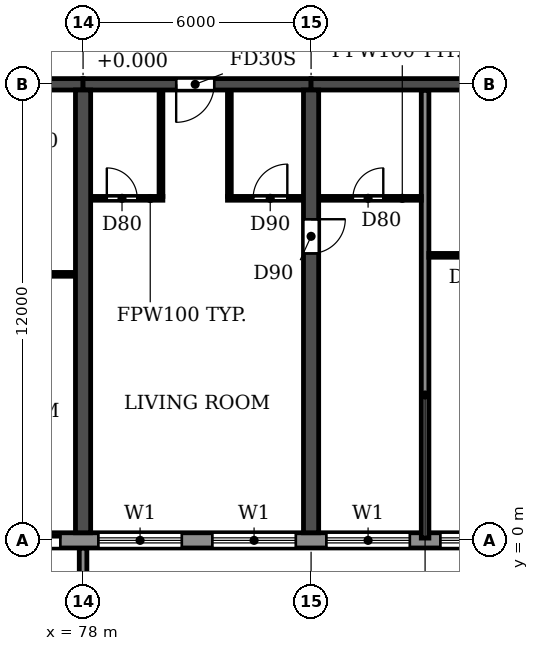
"""IFC4 building model, lengths in metres.
Left out: names, types, materials, properties, quantities, classifications, styles, units other than length and angle.
Written with IfcOpenShell. Run it as: python <this file> out.ifc"""

import sys

from ifc_helpers import new_model, si_unit, direction, frame, frame_2d, origin, place, context, subcontext, project, spatial, polyline, rectangle, outline, extrude, source, transform, mapped, element, fill, save


model = new_model("IFC4")
c1 = context("Model", 3, precision=1e-05, world=origin(), true_north=direction((0.0, 1.0)))
c2 = subcontext(c1, "Body", "Model", "MODEL_VIEW")
j1 = project(units=[si_unit("LENGTHUNIT", "METRE"), si_unit("PLANEANGLEUNIT", "RADIAN")], contexts=[c1])
p1 = place(None, origin())
s1 = spatial("IfcSite", under=j1, at=p1, CompositionType="ELEMENT")
p2 = place(p1, origin())
s2 = spatial("IfcBuilding", under=s1, at=p2, CompositionType="ELEMENT")
p3 = place(p2, frame((0.0, 0.0, 33.3)))
s3 = spatial("IfcBuildingStorey", under=s2, at=p3, CompositionType="ELEMENT", Elevation=33.3)
p4 = place(p3, frame((78.0, 0.2, 0.0), z_axis=(0.0, 0.0, 1.0), x_axis=(0.0, 1.0, 0.0)))
e1 = element("IfcWall", 1, at=p4, inside=s3, PredefinedType="SHEAR", context=c2, shape_type="SweptSolid", body=[
    extrude(rectangle(XDim=11.65, YDim=0.4, at=frame_2d((5.825, 0.0))), origin(), (0.0, 0.0, 1.0), 3.05),
])
p5 = place(p3, frame((84.0, 0.2, 0.0), z_axis=(0.0, 0.0, 1.0), x_axis=(0.0, 1.0, 0.0)))
e2 = element("IfcWall", 2, at=p5, inside=s3, PredefinedType="SHEAR", context=c2, shape_type="SweptSolid", body=[
    extrude(rectangle(XDim=11.65, YDim=0.4, at=frame_2d((5.825, 0.0))), origin(), (0.0, 0.0, 1.0), 3.05),
])
p6 = place(p5, frame((7.35, 0.0, 0.0)))
e3 = element("IfcOpeningElement", 3, at=p6, cuts=e2, PredefinedType="OPENING", context=c2, shape_type="SweptSolid", body=[
    extrude(rectangle(XDim=0.9, YDim=2.1, at=frame_2d((0.45, 1.05))), frame((0.0, 0.21, 0.0), z_axis=(0.0, -1.0, 0.0), x_axis=(1.0, 0.0, 0.0)), (0.0, 0.0, 1.0), 0.42),
])
p7 = place(p3, frame((72.0, 12.0, 0.0), z_axis=(0.0, 0.0, 1.0), x_axis=(1.0, 0.0, 0.0)))
e4 = element("IfcWall", 4, at=p7, inside=s3, PredefinedType="SHEAR", context=c2, shape_type="SweptSolid", body=[
    extrude(rectangle(XDim=6.0, YDim=0.3, at=frame_2d((3.0, 0.0))), origin(), (0.0, 0.0, 1.0), 2.45),
])
p8 = place(p7, frame((2.45, 0.0, 0.0)))
e5 = element("IfcOpeningElement", 5, at=p8, cuts=e4, PredefinedType="OPENING", context=c2, shape_type="SweptSolid", body=[
    extrude(rectangle(XDim=1.0, YDim=2.1, at=frame_2d((0.5, 1.05))), frame((0.0, 0.16, 0.0), z_axis=(0.0, -1.0, 0.0), x_axis=(1.0, 0.0, 0.0)), (0.0, 0.0, 1.0), 0.32),
])
p9 = place(p3, frame((78.0, 12.0, 0.0), z_axis=(0.0, 0.0, 1.0), x_axis=(1.0, 0.0, 0.0)))
e6 = element("IfcWall", 6, at=p9, inside=s3, PredefinedType="SHEAR", context=c2, shape_type="SweptSolid", body=[
    extrude(rectangle(XDim=6.0, YDim=0.3, at=frame_2d((3.0, 0.0))), origin(), (0.0, 0.0, 1.0), 2.45),
])
p10 = place(p9, frame((2.45, 0.0, 0.0)))
e7 = element("IfcOpeningElement", 7, at=p10, cuts=e6, PredefinedType="OPENING", context=c2, shape_type="SweptSolid", body=[
    extrude(rectangle(XDim=1.0, YDim=2.1, at=frame_2d((0.5, 1.05))), frame((0.0, 0.16, 0.0), z_axis=(0.0, -1.0, 0.0), x_axis=(1.0, 0.0, 0.0)), (0.0, 0.0, 1.0), 0.32),
])
p11 = place(p3, frame((84.0, 12.0, 0.0), z_axis=(0.0, 0.0, 1.0), x_axis=(1.0, 0.0, 0.0)))
e8 = element("IfcWall", 8, at=p11, inside=s3, PredefinedType="SHEAR", context=c2, shape_type="SweptSolid", body=[
    extrude(rectangle(XDim=6.0, YDim=0.3, at=frame_2d((3.0, 0.0))), origin(), (0.0, 0.0, 1.0), 2.45),
])
p12 = place(p3, frame((4.683, 0.0, 0.0), z_axis=(0.0, 0.0, 1.0), x_axis=(1.0, 0.0, 0.0)))
e9 = element("IfcWall", 9, at=p12, inside=s3, PredefinedType="STANDARD", context=c2, shape_type="SweptSolid", body=[
    extrude(rectangle(XDim=92.634, YDim=0.4, at=frame_2d((46.317, 0.0))), origin(), (0.0, 0.0, 1.0), 3.05),
])
p13 = place(p12, frame((1.717, 0.0, 0.9)))
e10 = element("IfcOpeningElement", 10, at=p13, cuts=e9, PredefinedType="OPENING", context=c2, shape_type="SweptSolid", body=[
    extrude(rectangle(XDim=2.2, YDim=1.5, at=frame_2d((1.1, 0.75))), frame((0.0, 0.21, 0.0), z_axis=(0.0, -1.0, 0.0), x_axis=(1.0, 0.0, 0.0)), (0.0, 0.0, 1.0), 0.42),
])
p14 = place(p12, frame((4.717, 0.0, 0.9)))
e11 = element("IfcOpeningElement", 11, at=p14, cuts=e9, PredefinedType="OPENING", context=c2, shape_type="SweptSolid", body=[
    extrude(rectangle(XDim=2.2, YDim=1.5, at=frame_2d((1.1, 0.75))), frame((0.0, 0.21, 0.0), z_axis=(0.0, -1.0, 0.0), x_axis=(1.0, 0.0, 0.0)), (0.0, 0.0, 1.0), 0.42),
])
p15 = place(p12, frame((7.917, 0.0, 0.0)))
e12 = element("IfcOpeningElement", 12, at=p15, cuts=e9, PredefinedType="OPENING", context=c2, shape_type="SweptSolid", body=[
    extrude(rectangle(XDim=1.8, YDim=2.4, at=frame_2d((0.9, 1.2))), frame((0.0, 0.21, 0.0), z_axis=(0.0, -1.0, 0.0), x_axis=(1.0, 0.0, 0.0)), (0.0, 0.0, 1.0), 0.42),
])
p16 = place(p12, frame((10.717, 0.0, 0.9)))
e13 = element("IfcOpeningElement", 13, at=p16, cuts=e9, PredefinedType="OPENING", context=c2, shape_type="SweptSolid", body=[
    extrude(rectangle(XDim=2.2, YDim=1.5, at=frame_2d((1.1, 0.75))), frame((0.0, 0.21, 0.0), z_axis=(0.0, -1.0, 0.0), x_axis=(1.0, 0.0, 0.0)), (0.0, 0.0, 1.0), 0.42),
])
p17 = place(p12, frame((13.717, 0.0, 0.9)))
e14 = element("IfcOpeningElement", 14, at=p17, cuts=e9, PredefinedType="OPENING", context=c2, shape_type="SweptSolid", body=[
    extrude(rectangle(XDim=2.2, YDim=1.5, at=frame_2d((1.1, 0.75))), frame((0.0, 0.21, 0.0), z_axis=(0.0, -1.0, 0.0), x_axis=(1.0, 0.0, 0.0)), (0.0, 0.0, 1.0), 0.42),
])
p18 = place(p12, frame((16.717, 0.0, 0.9)))
e15 = element("IfcOpeningElement", 15, at=p18, cuts=e9, PredefinedType="OPENING", context=c2, shape_type="SweptSolid", body=[
    extrude(rectangle(XDim=2.2, YDim=1.5, at=frame_2d((1.1, 0.75))), frame((0.0, 0.21, 0.0), z_axis=(0.0, -1.0, 0.0), x_axis=(1.0, 0.0, 0.0)), (0.0, 0.0, 1.0), 0.42),
])
p19 = place(p12, frame((19.717, 0.0, 0.9)))
e16 = element("IfcOpeningElement", 16, at=p19, cuts=e9, PredefinedType="OPENING", context=c2, shape_type="SweptSolid", body=[
    extrude(rectangle(XDim=2.2, YDim=1.5, at=frame_2d((1.1, 0.75))), frame((0.0, 0.21, 0.0), z_axis=(0.0, -1.0, 0.0), x_axis=(1.0, 0.0, 0.0)), (0.0, 0.0, 1.0), 0.42),
])
p20 = place(p12, frame((22.917, 0.0, 0.0)))
e17 = element("IfcOpeningElement", 17, at=p20, cuts=e9, PredefinedType="OPENING", context=c2, shape_type="SweptSolid", body=[
    extrude(rectangle(XDim=1.8, YDim=2.4, at=frame_2d((0.9, 1.2))), frame((0.0, 0.21, 0.0), z_axis=(0.0, -1.0, 0.0), x_axis=(1.0, 0.0, 0.0)), (0.0, 0.0, 1.0), 0.42),
])
p21 = place(p12, frame((25.717, 0.0, 0.9)))
e18 = element("IfcOpeningElement", 18, at=p21, cuts=e9, PredefinedType="OPENING", context=c2, shape_type="SweptSolid", body=[
    extrude(rectangle(XDim=2.2, YDim=1.5, at=frame_2d((1.1, 0.75))), frame((0.0, 0.21, 0.0), z_axis=(0.0, -1.0, 0.0), x_axis=(1.0, 0.0, 0.0)), (0.0, 0.0, 1.0), 0.42),
])
p22 = place(p12, frame((28.717, 0.0, 0.9)))
e19 = element("IfcOpeningElement", 19, at=p22, cuts=e9, PredefinedType="OPENING", context=c2, shape_type="SweptSolid", body=[
    extrude(rectangle(XDim=2.2, YDim=1.5, at=frame_2d((1.1, 0.75))), frame((0.0, 0.21, 0.0), z_axis=(0.0, -1.0, 0.0), x_axis=(1.0, 0.0, 0.0)), (0.0, 0.0, 1.0), 0.42),
])
p23 = place(p12, frame((31.717, 0.0, 0.9)))
e20 = element("IfcOpeningElement", 20, at=p23, cuts=e9, PredefinedType="OPENING", context=c2, shape_type="SweptSolid", body=[
    extrude(rectangle(XDim=2.2, YDim=1.5, at=frame_2d((1.1, 0.75))), frame((0.0, 0.21, 0.0), z_axis=(0.0, -1.0, 0.0), x_axis=(1.0, 0.0, 0.0)), (0.0, 0.0, 1.0), 0.42),
])
p24 = place(p12, frame((34.717, 0.0, 0.9)))
e21 = element("IfcOpeningElement", 21, at=p24, cuts=e9, PredefinedType="OPENING", context=c2, shape_type="SweptSolid", body=[
    extrude(rectangle(XDim=2.2, YDim=1.5, at=frame_2d((1.1, 0.75))), frame((0.0, 0.21, 0.0), z_axis=(0.0, -1.0, 0.0), x_axis=(1.0, 0.0, 0.0)), (0.0, 0.0, 1.0), 0.42),
])
p25 = place(p12, frame((37.717, 0.0, 0.9)))
e22 = element("IfcOpeningElement", 22, at=p25, cuts=e9, PredefinedType="OPENING", context=c2, shape_type="SweptSolid", body=[
    extrude(rectangle(XDim=2.2, YDim=1.5, at=frame_2d((1.1, 0.75))), frame((0.0, 0.21, 0.0), z_axis=(0.0, -1.0, 0.0), x_axis=(1.0, 0.0, 0.0)), (0.0, 0.0, 1.0), 0.42),
])
p26 = place(p12, frame((40.717, 0.0, 0.9)))
e23 = element("IfcOpeningElement", 23, at=p26, cuts=e9, PredefinedType="OPENING", context=c2, shape_type="SweptSolid", body=[
    extrude(rectangle(XDim=2.2, YDim=1.5, at=frame_2d((1.1, 0.75))), frame((0.0, 0.21, 0.0), z_axis=(0.0, -1.0, 0.0), x_axis=(1.0, 0.0, 0.0)), (0.0, 0.0, 1.0), 0.42),
])
p27 = place(p12, frame((43.717, 0.0, 0.9)))
e24 = element("IfcOpeningElement", 24, at=p27, cuts=e9, PredefinedType="OPENING", context=c2, shape_type="SweptSolid", body=[
    extrude(rectangle(XDim=2.2, YDim=1.5, at=frame_2d((1.1, 0.75))), frame((0.0, 0.21, 0.0), z_axis=(0.0, -1.0, 0.0), x_axis=(1.0, 0.0, 0.0)), (0.0, 0.0, 1.0), 0.42),
])
p28 = place(p12, frame((46.917, 0.0, 0.0)))
e25 = element("IfcOpeningElement", 25, at=p28, cuts=e9, PredefinedType="OPENING", context=c2, shape_type="SweptSolid", body=[
    extrude(rectangle(XDim=1.8, YDim=2.4, at=frame_2d((0.9, 1.2))), frame((0.0, 0.21, 0.0), z_axis=(0.0, -1.0, 0.0), x_axis=(1.0, 0.0, 0.0)), (0.0, 0.0, 1.0), 0.42),
])
p29 = place(p12, frame((49.717, 0.0, 0.9)))
e26 = element("IfcOpeningElement", 26, at=p29, cuts=e9, PredefinedType="OPENING", context=c2, shape_type="SweptSolid", body=[
    extrude(rectangle(XDim=2.2, YDim=1.5, at=frame_2d((1.1, 0.75))), frame((0.0, 0.21, 0.0), z_axis=(0.0, -1.0, 0.0), x_axis=(1.0, 0.0, 0.0)), (0.0, 0.0, 1.0), 0.42),
])
p30 = place(p12, frame((52.717, 0.0, 0.9)))
e27 = element("IfcOpeningElement", 27, at=p30, cuts=e9, PredefinedType="OPENING", context=c2, shape_type="SweptSolid", body=[
    extrude(rectangle(XDim=2.2, YDim=1.5, at=frame_2d((1.1, 0.75))), frame((0.0, 0.21, 0.0), z_axis=(0.0, -1.0, 0.0), x_axis=(1.0, 0.0, 0.0)), (0.0, 0.0, 1.0), 0.42),
])
p31 = place(p12, frame((55.717, 0.0, 0.9)))
e28 = element("IfcOpeningElement", 28, at=p31, cuts=e9, PredefinedType="OPENING", context=c2, shape_type="SweptSolid", body=[
    extrude(rectangle(XDim=2.2, YDim=1.5, at=frame_2d((1.1, 0.75))), frame((0.0, 0.21, 0.0), z_axis=(0.0, -1.0, 0.0), x_axis=(1.0, 0.0, 0.0)), (0.0, 0.0, 1.0), 0.42),
])
p32 = place(p12, frame((58.917, 0.0, 0.0)))
e29 = element("IfcOpeningElement", 29, at=p32, cuts=e9, PredefinedType="OPENING", context=c2, shape_type="SweptSolid", body=[
    extrude(rectangle(XDim=1.8, YDim=2.4, at=frame_2d((0.9, 1.2))), frame((0.0, 0.21, 0.0), z_axis=(0.0, -1.0, 0.0), x_axis=(1.0, 0.0, 0.0)), (0.0, 0.0, 1.0), 0.42),
])
p33 = place(p12, frame((61.717, 0.0, 0.9)))
e30 = element("IfcOpeningElement", 30, at=p33, cuts=e9, PredefinedType="OPENING", context=c2, shape_type="SweptSolid", body=[
    extrude(rectangle(XDim=2.2, YDim=1.5, at=frame_2d((1.1, 0.75))), frame((0.0, 0.21, 0.0), z_axis=(0.0, -1.0, 0.0), x_axis=(1.0, 0.0, 0.0)), (0.0, 0.0, 1.0), 0.42),
])
p34 = place(p12, frame((64.717, 0.0, 0.9)))
e31 = element("IfcOpeningElement", 31, at=p34, cuts=e9, PredefinedType="OPENING", context=c2, shape_type="SweptSolid", body=[
    extrude(rectangle(XDim=2.2, YDim=1.5, at=frame_2d((1.1, 0.75))), frame((0.0, 0.21, 0.0), z_axis=(0.0, -1.0, 0.0), x_axis=(1.0, 0.0, 0.0)), (0.0, 0.0, 1.0), 0.42),
])
p35 = place(p12, frame((67.717, 0.0, 0.9)))
e32 = element("IfcOpeningElement", 32, at=p35, cuts=e9, PredefinedType="OPENING", context=c2, shape_type="SweptSolid", body=[
    extrude(rectangle(XDim=2.2, YDim=1.5, at=frame_2d((1.1, 0.75))), frame((0.0, 0.21, 0.0), z_axis=(0.0, -1.0, 0.0), x_axis=(1.0, 0.0, 0.0)), (0.0, 0.0, 1.0), 0.42),
])
p36 = place(p12, frame((70.917, 0.0, 0.0)))
e33 = element("IfcOpeningElement", 33, at=p36, cuts=e9, PredefinedType="OPENING", context=c2, shape_type="SweptSolid", body=[
    extrude(rectangle(XDim=1.8, YDim=2.4, at=frame_2d((0.9, 1.2))), frame((0.0, 0.21, 0.0), z_axis=(0.0, -1.0, 0.0), x_axis=(1.0, 0.0, 0.0)), (0.0, 0.0, 1.0), 0.42),
])
p37 = place(p12, frame((73.717, 0.0, 0.9)))
e34 = element("IfcOpeningElement", 34, at=p37, cuts=e9, PredefinedType="OPENING", context=c2, shape_type="SweptSolid", body=[
    extrude(rectangle(XDim=2.2, YDim=1.5, at=frame_2d((1.1, 0.75))), frame((0.0, 0.21, 0.0), z_axis=(0.0, -1.0, 0.0), x_axis=(1.0, 0.0, 0.0)), (0.0, 0.0, 1.0), 0.42),
])
p38 = place(p12, frame((76.717, 0.0, 0.9)))
e35 = element("IfcOpeningElement", 35, at=p38, cuts=e9, PredefinedType="OPENING", context=c2, shape_type="SweptSolid", body=[
    extrude(rectangle(XDim=2.2, YDim=1.5, at=frame_2d((1.1, 0.75))), frame((0.0, 0.21, 0.0), z_axis=(0.0, -1.0, 0.0), x_axis=(1.0, 0.0, 0.0)), (0.0, 0.0, 1.0), 0.42),
])
p39 = place(p12, frame((79.717, 0.0, 0.9)))
e36 = element("IfcOpeningElement", 36, at=p39, cuts=e9, PredefinedType="OPENING", context=c2, shape_type="SweptSolid", body=[
    extrude(rectangle(XDim=2.2, YDim=1.5, at=frame_2d((1.1, 0.75))), frame((0.0, 0.21, 0.0), z_axis=(0.0, -1.0, 0.0), x_axis=(1.0, 0.0, 0.0)), (0.0, 0.0, 1.0), 0.42),
])
p40 = place(p12, frame((82.717, 0.0, 0.9)))
e37 = element("IfcOpeningElement", 37, at=p40, cuts=e9, PredefinedType="OPENING", context=c2, shape_type="SweptSolid", body=[
    extrude(rectangle(XDim=2.2, YDim=1.5, at=frame_2d((1.1, 0.75))), frame((0.0, 0.21, 0.0), z_axis=(0.0, -1.0, 0.0), x_axis=(1.0, 0.0, 0.0)), (0.0, 0.0, 1.0), 0.42),
])
p41 = place(p12, frame((85.717, 0.0, 0.9)))
e38 = element("IfcOpeningElement", 38, at=p41, cuts=e9, PredefinedType="OPENING", context=c2, shape_type="SweptSolid", body=[
    extrude(rectangle(XDim=2.2, YDim=1.5, at=frame_2d((1.1, 0.75))), frame((0.0, 0.21, 0.0), z_axis=(0.0, -1.0, 0.0), x_axis=(1.0, 0.0, 0.0)), (0.0, 0.0, 1.0), 0.42),
])
p42 = place(p12, frame((88.717, 0.0, 0.9)))
e39 = element("IfcOpeningElement", 39, at=p42, cuts=e9, PredefinedType="OPENING", context=c2, shape_type="SweptSolid", body=[
    extrude(rectangle(XDim=2.2, YDim=1.5, at=frame_2d((1.1, 0.75))), frame((0.0, 0.21, 0.0), z_axis=(0.0, -1.0, 0.0), x_axis=(1.0, 0.0, 0.0)), (0.0, 0.0, 1.0), 0.42),
])
m1 = source(origin(), c2, "Body", "SweptSolid", [
    extrude(outline(polyline([(0.0, 0.0), (0.2, 0.0), (0.2, 1.65), (0.0, 1.65), (0.0, 0.0)])), origin(), (0.0, 0.0, 1.0), 3.1),
])
p43 = place(p3, frame((77.9, -1.85, 0.0)))
e40 = element("IfcWall", 40, at=p43, inside=s3, PredefinedType="STANDARD", context=c2, shape_type="MappedRepresentation", body=[
    mapped(m1, transform((0.0, 0.0, 0.0))),
])
p44 = place(p3, frame((87.0, 0.06, 0.0), z_axis=(0.0, 0.0, 1.0), x_axis=(0.0, 1.0, 0.0)))
e41 = element("IfcWall", 41, at=p44, inside=s3, PredefinedType="PARTITIONING", context=c2, shape_type="SweptSolid", body=[
    extrude(rectangle(XDim=11.78, YDim=0.2, at=frame_2d((5.89, 0.0))), origin(), (0.0, 0.0, 1.0), 3.05),
])
p45 = place(p3, frame((75.8, 7.0, 0.0), z_axis=(0.0, 0.0, 1.0), x_axis=(1.0, 0.0, 0.0)))
e42 = element("IfcWall", 42, at=p45, inside=s3, PredefinedType="PARTITIONING", context=c2, shape_type="SweptSolid", body=[
    extrude(rectangle(XDim=1.99, YDim=0.1, at=frame_2d((0.995, 0.0))), origin(), (0.0, 0.0, 1.0), 3.05),
])
p46 = place(p3, frame((87.1, 7.5, 0.0), z_axis=(0.0, 0.0, 1.0), x_axis=(1.0, 0.0, 0.0)))
e43 = element("IfcWall", 43, at=p46, inside=s3, PredefinedType="PARTITIONING", context=c2, shape_type="SweptSolid", body=[
    extrude(rectangle(XDim=2.69, YDim=0.1, at=frame_2d((1.345, 0.0))), origin(), (0.0, 0.0, 1.0), 3.05),
])
p47 = place(p46, frame((1.0, 0.0, 0.0)))
e44 = element("IfcOpeningElement", 44, at=p47, cuts=e43, PredefinedType="OPENING", context=c2, shape_type="SweptSolid", body=[
    extrude(rectangle(XDim=0.8, YDim=2.1, at=frame_2d((0.4, 1.05))), frame((0.0, 0.06, 0.0), z_axis=(0.0, -1.0, 0.0), x_axis=(1.0, 0.0, 0.0)), (0.0, 0.0, 1.0), 0.12),
])
p48 = place(p3, frame((78.21, 9.0, 0.0), z_axis=(0.0, 0.0, 1.0), x_axis=(1.0, 0.0, 0.0)))
e45 = element("IfcWall", 45, at=p48, inside=s3, PredefinedType="PARTITIONING", context=c2, shape_type="SweptSolid", body=[
    extrude(rectangle(XDim=1.89, YDim=0.1, at=frame_2d((0.945, 0.0))), origin(), (0.0, 0.0, 1.0), 3.05),
])
p49 = place(p48, frame((0.415, 0.0, 0.0)))
e46 = element("IfcOpeningElement", 46, at=p49, cuts=e45, PredefinedType="OPENING", context=c2, shape_type="SweptSolid", body=[
    extrude(rectangle(XDim=0.8, YDim=2.1, at=frame_2d((0.4, 1.05))), frame((0.0, 0.06, 0.0), z_axis=(0.0, -1.0, 0.0), x_axis=(1.0, 0.0, 0.0)), (0.0, 0.0, 1.0), 0.12),
])
p50 = place(p3, frame((81.8, 9.0, 0.0), z_axis=(0.0, 0.0, 1.0), x_axis=(1.0, 0.0, 0.0)))
e47 = element("IfcWall", 47, at=p50, inside=s3, PredefinedType="PARTITIONING", context=c2, shape_type="SweptSolid", body=[
    extrude(rectangle(XDim=1.99, YDim=0.1, at=frame_2d((0.995, 0.0))), origin(), (0.0, 0.0, 1.0), 3.05),
])
p51 = place(p50, frame((0.675, 0.0, 0.0)))
e48 = element("IfcOpeningElement", 48, at=p51, cuts=e47, PredefinedType="OPENING", context=c2, shape_type="SweptSolid", body=[
    extrude(rectangle(XDim=0.9, YDim=2.1, at=frame_2d((0.45, 1.05))), frame((0.0, 0.06, 0.0), z_axis=(0.0, -1.0, 0.0), x_axis=(1.0, 0.0, 0.0)), (0.0, 0.0, 1.0), 0.12),
])
p52 = place(p3, frame((84.21, 9.0, 0.0), z_axis=(0.0, 0.0, 1.0), x_axis=(1.0, 0.0, 0.0)))
e49 = element("IfcWall", 49, at=p52, inside=s3, PredefinedType="PARTITIONING", context=c2, shape_type="SweptSolid", body=[
    extrude(rectangle(XDim=2.69, YDim=0.1, at=frame_2d((1.345, 0.0))), origin(), (0.0, 0.0, 1.0), 3.05),
])
p53 = place(p52, frame((0.89, 0.0, 0.0)))
e50 = element("IfcOpeningElement", 50, at=p53, cuts=e49, PredefinedType="OPENING", context=c2, shape_type="SweptSolid", body=[
    extrude(rectangle(XDim=0.8, YDim=2.1, at=frame_2d((0.4, 1.05))), frame((0.0, 0.06, 0.0), z_axis=(0.0, -1.0, 0.0), x_axis=(1.0, 0.0, 0.0)), (0.0, 0.0, 1.0), 0.12),
])
for number, where, z_axis, x_axis in (
    (51, (80.05, 9.05, 0.0), (0.0, 0.0, 1.0), (0.0, 1.0, 0.0)),
    (52, (81.85, 9.05, 0.0), (0.0, 0.0, 1.0), (0.0, 1.0, 0.0)),
):
    element("IfcWall", number, at=place(p3, frame(where, z_axis=z_axis, x_axis=x_axis)), inside=s3, PredefinedType="PARTITIONING", context=c2, shape_type="SweptSolid", body=[
        extrude(rectangle(XDim=2.79, YDim=0.1, at=frame_2d((1.395, 0.0))), origin(), (0.0, 0.0, 1.0), 3.05),
    ])
p54 = place(p36, origin())
e53 = element("IfcDoor", 53, at=p54, inside=s3, OperationType="DOUBLE_DOOR_SLIDING", PredefinedType="DOOR", context=c2, shape_type="SweptSolid", body=[
    extrude(rectangle(XDim=1.8, YDim=2.4, at=frame_2d((0.9, 1.2))), frame((0.0, 0.025, 0.0), z_axis=(0.0, -1.0, 0.0), x_axis=(1.0, 0.0, 0.0)), (0.0, 0.0, 1.0), 0.05),
])
fill(e33, e53)
p55 = place(p37, origin())
e54 = element("IfcWindow", 54, at=p55, inside=s3, PartitioningType="DOUBLE_PANEL_HORIZONTAL", PredefinedType="WINDOW", context=c2, shape_type="SweptSolid", body=[
    extrude(rectangle(XDim=2.2, YDim=1.5, at=frame_2d((1.1, 0.75))), frame((0.0, 0.03, 0.0), z_axis=(0.0, -1.0, 0.0), x_axis=(1.0, 0.0, 0.0)), (0.0, 0.0, 1.0), 0.06),
])
fill(e34, e54)
p56 = place(p38, origin())
e55 = element("IfcWindow", 55, at=p56, inside=s3, PartitioningType="DOUBLE_PANEL_HORIZONTAL", PredefinedType="WINDOW", context=c2, shape_type="SweptSolid", body=[
    extrude(rectangle(XDim=2.2, YDim=1.5, at=frame_2d((1.1, 0.75))), frame((0.0, 0.03, 0.0), z_axis=(0.0, -1.0, 0.0), x_axis=(1.0, 0.0, 0.0)), (0.0, 0.0, 1.0), 0.06),
])
fill(e35, e55)
p57 = place(p39, origin())
e56 = element("IfcWindow", 56, at=p57, inside=s3, PartitioningType="DOUBLE_PANEL_HORIZONTAL", PredefinedType="WINDOW", context=c2, shape_type="SweptSolid", body=[
    extrude(rectangle(XDim=2.2, YDim=1.5, at=frame_2d((1.1, 0.75))), frame((0.0, 0.03, 0.0), z_axis=(0.0, -1.0, 0.0), x_axis=(1.0, 0.0, 0.0)), (0.0, 0.0, 1.0), 0.06),
])
fill(e36, e56)
p58 = place(p40, origin())
e57 = element("IfcWindow", 57, at=p58, inside=s3, PartitioningType="DOUBLE_PANEL_HORIZONTAL", PredefinedType="WINDOW", context=c2, shape_type="SweptSolid", body=[
    extrude(rectangle(XDim=2.2, YDim=1.5, at=frame_2d((1.1, 0.75))), frame((0.0, 0.03, 0.0), z_axis=(0.0, -1.0, 0.0), x_axis=(1.0, 0.0, 0.0)), (0.0, 0.0, 1.0), 0.06),
])
fill(e37, e57)
p59 = place(p53, origin())
e58 = element("IfcDoor", 58, at=p59, inside=s3, OperationType="SINGLE_SWING_RIGHT", PredefinedType="DOOR", context=c2, shape_type="SweptSolid", body=[
    extrude(rectangle(XDim=0.8, YDim=2.1, at=frame_2d((0.4, 1.05))), frame((0.0, 0.025, 0.0), z_axis=(0.0, -1.0, 0.0), x_axis=(1.0, 0.0, 0.0)), (0.0, 0.0, 1.0), 0.05),
])
fill(e50, e58)
p60 = place(p49, origin())
e59 = element("IfcDoor", 59, at=p60, inside=s3, OperationType="SINGLE_SWING_LEFT", PredefinedType="DOOR", context=c2, shape_type="SweptSolid", body=[
    extrude(rectangle(XDim=0.8, YDim=2.1, at=frame_2d((0.4, 1.05))), frame((0.0, 0.025, 0.0), z_axis=(0.0, -1.0, 0.0), x_axis=(1.0, 0.0, 0.0)), (0.0, 0.0, 1.0), 0.05),
])
fill(e46, e59)
p61 = place(p10, frame((1.0, 0.0, 0.0), z_axis=(0.0, 0.0, 1.0), x_axis=(-1.0, 0.0, 0.0)))
e60 = element("IfcDoor", 60, at=p61, inside=s3, OperationType="SINGLE_SWING_RIGHT", PredefinedType="DOOR", context=c2, shape_type="SweptSolid", body=[
    extrude(rectangle(XDim=1.0, YDim=2.1, at=frame_2d((0.5, 1.05))), frame((0.0, 0.025, 0.0), z_axis=(0.0, -1.0, 0.0), x_axis=(1.0, 0.0, 0.0)), (0.0, 0.0, 1.0), 0.05),
])
fill(e7, e60)
p62 = place(p51, origin())
e61 = element("IfcDoor", 61, at=p62, inside=s3, OperationType="SINGLE_SWING_RIGHT", PredefinedType="DOOR", context=c2, shape_type="SweptSolid", body=[
    extrude(rectangle(XDim=0.9, YDim=2.1, at=frame_2d((0.45, 1.05))), frame((0.0, 0.025, 0.0), z_axis=(0.0, -1.0, 0.0), x_axis=(1.0, 0.0, 0.0)), (0.0, 0.0, 1.0), 0.05),
])
fill(e48, e61)
p63 = place(p6, frame((0.9, 0.0, 0.0), z_axis=(0.0, 0.0, 1.0), x_axis=(-1.0, 0.0, 0.0)))
e62 = element("IfcDoor", 62, at=p63, inside=s3, OperationType="SINGLE_SWING_LEFT", PredefinedType="DOOR", context=c2, shape_type="SweptSolid", body=[
    extrude(rectangle(XDim=0.9, YDim=2.1, at=frame_2d((0.45, 1.05))), frame((0.0, 0.025, 0.0), z_axis=(0.0, -1.0, 0.0), x_axis=(1.0, 0.0, 0.0)), (0.0, 0.0, 1.0), 0.05),
])
fill(e3, e62)
save(model, sys.argv[1])
